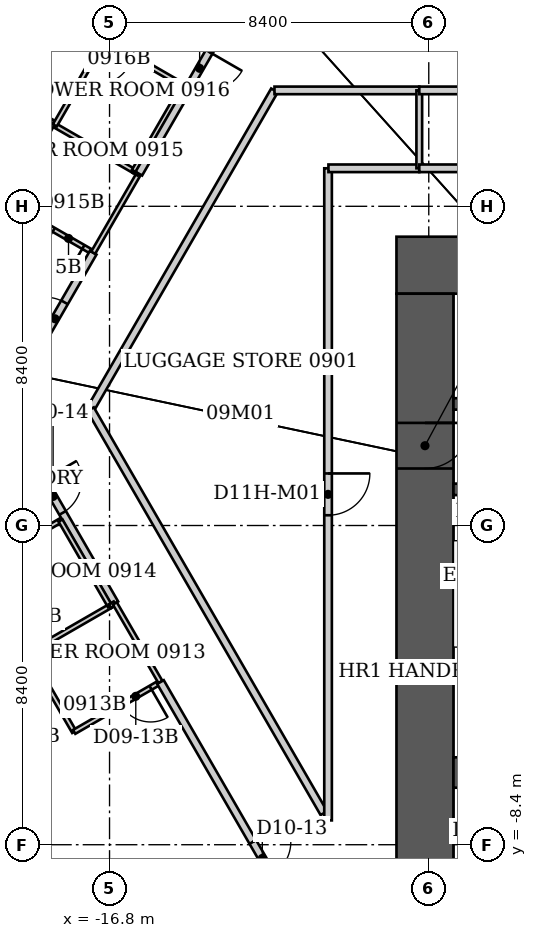
"""IFC4 building model, lengths in metres.
Left out: names, types, materials, properties, quantities, classifications, styles, units other than length and angle.
Written with IfcOpenShell. Run it as: python <this file> out.ifc"""

import sys

from ifc_helpers import new_model, si_unit, direction, frame, frame_2d, origin, place, context, subcontext, project, spatial, rectangle, extrude, element, fill, save


model = new_model("IFC4")
c1 = context("Model", 3, precision=1e-05, world=origin(), true_north=direction((0.0, 1.0)))
c2 = subcontext(c1, "Body", "Model", "MODEL_VIEW")
j1 = project(units=[si_unit("LENGTHUNIT", "METRE"), si_unit("PLANEANGLEUNIT", "RADIAN")], contexts=[c1])
p1 = place(None, origin())
s1 = spatial("IfcSite", under=j1, at=p1, CompositionType="ELEMENT")
p2 = place(p1, origin())
s2 = spatial("IfcBuilding", under=s1, at=p2, CompositionType="ELEMENT")
p3 = place(p2, frame((0.0, 0.0, 42.0)))
s3 = spatial("IfcBuildingStorey", under=s2, at=p3, CompositionType="ELEMENT", Elevation=42.0)
p4 = place(p3, frame((-9.25, 6.85, 0.0), z_axis=(0.0, 0.0, 1.0), x_axis=(1.0, 0.0, 0.0)))
e1 = element("IfcWall", 1, at=p4, inside=s3, PredefinedType="SHEAR", context=c2, shape_type="SweptSolid", body=[
    extrude(rectangle(XDim=18.5, YDim=1.5, at=frame_2d((9.25, 0.0))), origin(), (0.0, 0.0, 1.0), 3.8),
])
p5 = place(p3, frame((-8.5, -9.2, 0.0), z_axis=(0.0, 0.0, 1.0), x_axis=(0.0, 1.0, 0.0)))
e2 = element("IfcWall", 2, at=p5, inside=s3, PredefinedType="SHEAR", context=c2, shape_type="SweptSolid", body=[
    extrude(rectangle(XDim=15.3, YDim=1.5, at=frame_2d((7.65, 0.0))), origin(), (0.0, 0.0, 1.0), 3.8),
])
p6 = place(p5, frame((10.7, 0.0, 0.0)))
e3 = element("IfcOpeningElement", 3, at=p6, cuts=e2, PredefinedType="OPENING", context=c2, shape_type="SweptSolid", body=[
    extrude(rectangle(XDim=1.2, YDim=2.2, at=frame_2d((0.6, 1.1))), frame((0.0, 0.75, 0.0), z_axis=(0.0, -1.0, 0.0), x_axis=(1.0, 0.0, 0.0)), (0.0, 0.0, 1.0), 1.5),
])
p7 = place(p3, frame((-7.75, -6.5, 0.0), z_axis=(0.0, 0.0, 1.0), x_axis=(1.0, 0.0, 0.0)))
e4 = element("IfcWall", 4, at=p7, inside=s3, PredefinedType="SHEAR", context=c2, shape_type="SweptSolid", body=[
    extrude(rectangle(XDim=15.5, YDim=0.8, at=frame_2d((7.75, 0.0))), origin(), (0.0, 0.0, 1.0), 3.8),
])
p8 = place(p3, frame((-7.75, 0.95, 0.0), z_axis=(0.0, 0.0, 1.0), x_axis=(1.0, 0.0, 0.0)))
e5 = element("IfcWall", 5, at=p8, inside=s3, PredefinedType="SHEAR", context=c2, shape_type="SweptSolid", body=[
    extrude(rectangle(XDim=3.0, YDim=0.3, at=frame_2d((1.5, 0.0))), origin(), (0.0, 0.0, 1.0), 3.8),
])
p9 = place(p8, frame((0.85, 0.0, 0.0)))
e6 = element("IfcOpeningElement", 6, at=p9, cuts=e5, PredefinedType="OPENING", context=c2, shape_type="SweptSolid", body=[
    extrude(rectangle(XDim=1.0, YDim=2.2, at=frame_2d((0.5, 1.1))), frame((0.0, 0.15, 0.0), z_axis=(0.0, -1.0, 0.0), x_axis=(1.0, 0.0, 0.0)), (0.0, 0.0, 1.0), 0.3),
])
p10 = place(p3, frame((-7.75, 3.2, 0.0), z_axis=(0.0, 0.0, 1.0), x_axis=(1.0, 0.0, 0.0)))
e7 = element("IfcWall", 7, at=p10, inside=s3, PredefinedType="SHEAR", context=c2, shape_type="SweptSolid", body=[
    extrude(rectangle(XDim=15.5, YDim=0.3, at=frame_2d((7.75, 0.0))), origin(), (0.0, 0.0, 1.0), 3.8),
])
p11 = place(p10, frame((5.944, 0.0, 0.0)))
e8 = element("IfcOpeningElement", 8, at=p11, cuts=e7, PredefinedType="OPENING", context=c2, shape_type="SweptSolid", body=[
    extrude(rectangle(XDim=1.1, YDim=2.2, at=frame_2d((0.55, 1.1))), frame((0.0, 0.15, 0.0), z_axis=(0.0, -1.0, 0.0), x_axis=(1.0, 0.0, 0.0)), (0.0, 0.0, 1.0), 0.3),
])
p12 = place(p10, frame((11.144, 0.0, 0.0)))
e9 = element("IfcOpeningElement", 9, at=p12, cuts=e7, PredefinedType="OPENING", context=c2, shape_type="SweptSolid", body=[
    extrude(rectangle(XDim=1.1, YDim=2.2, at=frame_2d((0.55, 1.1))), frame((0.0, 0.15, 0.0), z_axis=(0.0, -1.0, 0.0), x_axis=(1.0, 0.0, 0.0)), (0.0, 0.0, 1.0), 0.3),
])
p13 = place(p3, frame((-25.886, 14.95, 0.0), z_axis=(0.0, 0.0, 1.0), x_axis=(0.866018495177, -0.500011965869, 0.0)))
e10 = element("IfcWall", 10, at=p13, inside=s3, PredefinedType="PARTITIONING", context=c2, shape_type="SweptSolid", body=[
    extrude(rectangle(XDim=8.76, YDim=0.2, at=frame_2d((4.38, 0.0))), origin(), (0.0, 0.0, 1.0), 2.86),
])
p14 = place(p3, frame((-19.61, 3.06, 0.0), z_axis=(0.0, 0.0, 1.0), x_axis=(0.499983910424, -0.866034692906, 0.0)))
e11 = element("IfcWall", 11, at=p14, inside=s3, PredefinedType="PARTITIONING", context=c2, shape_type="SweptSolid", body=[
    extrude(rectangle(XDim=5.901, YDim=0.2, at=frame_2d((2.95, 0.0))), origin(), (0.0, 0.0, 1.0), 3.64),
])
p15 = place(p14, frame((2.15, 0.0, 0.0)))
e12 = element("IfcOpeningElement", 12, at=p15, cuts=e11, PredefinedType="OPENING", context=c2, shape_type="SweptSolid", body=[
    extrude(rectangle(XDim=1.0, YDim=2.13, at=frame_2d((0.5, 1.065))), frame((0.0, 0.1, 0.0), z_axis=(0.0, -1.0, 0.0), x_axis=(1.0, 0.0, 0.0)), (0.0, 0.0, 1.0), 0.2),
])
p16 = place(p3, frame((-19.5, 8.49, 0.0), z_axis=(0.0, 0.0, 1.0), x_axis=(0.866114241029, -0.499846097802, 0.0)))
e13 = element("IfcWall", 13, at=p16, inside=s3, PredefinedType="PARTITIONING", context=c2, shape_type="SweptSolid", body=[
    extrude(rectangle(XDim=2.621, YDim=0.12, at=frame_2d((1.311, 0.0))), origin(), (0.0, 0.0, 1.0), 3.64),
])
p17 = place(p16, frame((1.421, 0.0, 0.0)))
e14 = element("IfcOpeningElement", 14, at=p17, cuts=e13, PredefinedType="OPENING", context=c2, shape_type="SweptSolid", body=[
    extrude(rectangle(XDim=0.9, YDim=2.03, at=frame_2d((0.45, 1.015))), frame((0.0, 0.06, 0.0), z_axis=(0.0, -1.0, 0.0), x_axis=(1.0, 0.0, 0.0)), (0.0, 0.0, 1.0), 0.12),
])
p18 = place(p3, frame((-19.24, 3.7, 0.0), z_axis=(0.0, 0.0, 1.0), x_axis=(0.500157149565, 0.865934654428, 0.0)))
e15 = element("IfcWall", 15, at=p18, inside=s3, PredefinedType="PARTITIONING", context=c2, shape_type="SweptSolid", body=[
    extrude(rectangle(XDim=4.019, YDim=0.2, at=frame_2d((2.009, 0.0))), origin(), (0.0, 0.0, 1.0), 3.64),
])
p19 = place(p18, frame((1.51, 0.0, 0.0)))
e16 = element("IfcOpeningElement", 16, at=p19, cuts=e15, PredefinedType="OPENING", context=c2, shape_type="SweptSolid", body=[
    extrude(rectangle(XDim=1.0, YDim=2.13, at=frame_2d((0.5, 1.065))), frame((0.0, 0.1, 0.0), z_axis=(0.0, -1.0, 0.0), x_axis=(1.0, 0.0, 0.0)), (0.0, 0.0, 1.0), 0.2),
])
p20 = place(p3, frame((-18.93, -3.36, 0.0), z_axis=(0.0, 0.0, 1.0), x_axis=(0.501547039172, -0.865130376012, 0.0)))
e17 = element("IfcWall", 17, at=p20, inside=s3, PredefinedType="PARTITIONING", context=c2, shape_type="SweptSolid", body=[
    extrude(rectangle(XDim=2.393, YDim=0.12, at=frame_2d((1.196, 0.0))), origin(), (0.0, 0.0, 1.0), 3.64),
])
for number, where, z_axis, x_axis in (
    (18, (-18.868, -3.324, 0.0), (0.0, 0.0, 1.0), (0.866, 0.5, 0.0)),
    (19, (-18.3, 10.57, 0.0), (0.0, 0.0, 1.0), (-0.5, -0.866, 0.0)),
):
    element("IfcWall", number, at=place(p3, frame(where, z_axis=z_axis, x_axis=x_axis)), inside=s3, PredefinedType="PARTITIONING", context=c2, shape_type="SweptSolid", body=[
        extrude(rectangle(XDim=2.401, YDim=0.12, at=frame_2d((1.201, 0.0))), origin(), (0.0, 0.0, 1.0), 3.64),
    ])
p21 = place(p3, frame((-18.24, 10.53, 0.0), z_axis=(0.0, 0.0, 1.0), x_axis=(0.866202511239, -0.499693115345, 0.0)))
e20 = element("IfcWall", 20, at=p21, inside=s3, PredefinedType="PARTITIONING", context=c2, shape_type="SweptSolid", body=[
    extrude(rectangle(XDim=2.401, YDim=0.12, at=frame_2d((1.201, 0.0))), origin(), (0.0, 0.0, 1.0), 2.86),
])
p22 = place(p3, frame((-18.09, 0.13, 0.0), z_axis=(0.0, 0.0, 1.0), x_axis=(-0.866177122335, -0.499737123639, 0.0)))
e21 = element("IfcWall", 21, at=p22, inside=s3, PredefinedType="PARTITIONING", context=c2, shape_type="SweptSolid", body=[
    extrude(rectangle(XDim=2.401, YDim=0.12, at=frame_2d((1.201, 0.0))), origin(), (0.0, 0.0, 1.0), 3.64),
])
p23 = place(p3, frame((-17.73, -5.43, 0.0), z_axis=(0.0, 0.0, 1.0), x_axis=(0.866114241029, 0.499846097802, 0.0)))
e22 = element("IfcWall", 22, at=p23, inside=s3, PredefinedType="PARTITIONING", context=c2, shape_type="SweptSolid", body=[
    extrude(rectangle(XDim=2.621, YDim=0.12, at=frame_2d((1.311, 0.0))), origin(), (0.0, 0.0, 1.0), 2.878),
])
p24 = place(p23, frame((1.421, 0.0, 0.0)))
e23 = element("IfcOpeningElement", 23, at=p24, cuts=e22, PredefinedType="OPENING", context=c2, shape_type="SweptSolid", body=[
    extrude(rectangle(XDim=0.9, YDim=2.03, at=frame_2d((0.45, 1.015))), frame((0.0, 0.06, 0.0), z_axis=(0.0, -1.0, 0.0), x_axis=(1.0, 0.0, 0.0)), (0.0, 0.0, 1.0), 0.12),
])
p25 = place(p3, frame((-17.3, 3.06, 0.0), z_axis=(0.0, 0.0, 1.0), x_axis=(0.499704269421, 0.866196076603, 0.0)))
e24 = element("IfcWall", 24, at=p25, inside=s3, PredefinedType="PARTITIONING", context=c2, shape_type="SweptSolid", body=[
    extrude(rectangle(XDim=9.686, YDim=0.2, at=frame_2d((4.843, 0.0))), origin(), (0.0, 0.0, 1.0), 3.64),
])
p26 = place(p3, frame((-17.23, 7.18, 0.0), z_axis=(0.0, 0.0, 1.0), x_axis=(0.500009943768, 0.866019662671, 0.0)))
e25 = element("IfcWall", 25, at=p26, inside=s3, PredefinedType="PARTITIONING", context=c2, shape_type="SweptSolid", body=[
    extrude(rectangle(XDim=2.401, YDim=0.12, at=frame_2d((1.201, 0.0))), origin(), (0.0, 0.0, 1.0), 3.64),
])
p27 = place(p3, frame((-16.94, 12.78, 0.0), z_axis=(0.0, 0.0, 1.0), x_axis=(-0.500291685314, -0.865856933682, 0.0)))
e26 = element("IfcWall", 26, at=p27, inside=s3, PredefinedType="PARTITIONING", context=c2, shape_type="SweptSolid", body=[
    extrude(rectangle(XDim=2.599, YDim=0.12, at=frame_2d((1.299, 0.0))), origin(), (0.0, 0.0, 1.0), 3.64),
])
p28 = place(p27, frame((0.3, 0.0, 0.0)))
e27 = element("IfcOpeningElement", 27, at=p28, cuts=e26, PredefinedType="OPENING", context=c2, shape_type="SweptSolid", body=[
    extrude(rectangle(XDim=0.9, YDim=2.03, at=frame_2d((0.45, 1.015))), frame((0.0, 0.06, 0.0), z_axis=(0.0, -1.0, 0.0), x_axis=(1.0, 0.0, 0.0)), (0.0, 0.0, 1.0), 0.12),
])
p29 = place(p3, frame((-16.79, -2.12, 0.0), z_axis=(0.0, 0.0, 1.0), x_axis=(-0.50025099007, 0.865880446098, 0.0)))
e28 = element("IfcWall", 28, at=p29, inside=s3, PredefinedType="PARTITIONING", context=c2, shape_type="SweptSolid", body=[
    extrude(rectangle(XDim=2.599, YDim=0.12, at=frame_2d((1.299, 0.0))), origin(), (0.0, 0.0, 1.0), 3.64),
])
p30 = place(p3, frame((-16.788, -2.124, 0.0), z_axis=(0.0, 0.0, 1.0), x_axis=(0.866405716731, 0.499340699338, 0.0)))
e29 = element("IfcWall", 29, at=p30, inside=s3, PredefinedType="PARTITIONING", context=c2, shape_type="SweptSolid", body=[
    extrude(rectangle(XDim=0.148, YDim=0.12, at=frame_2d((0.074, 0.0))), origin(), (0.0, 0.0, 1.0), 3.64),
])
p31 = place(p3, frame((-16.66, -2.05, 0.0), z_axis=(0.0, 0.0, 1.0), x_axis=(0.501502765098, -0.865156041763, 0.0)))
e30 = element("IfcWall", 30, at=p31, inside=s3, PredefinedType="PARTITIONING", context=c2, shape_type="SweptSolid", body=[
    extrude(rectangle(XDim=2.393, YDim=0.12, at=frame_2d((1.196, 0.0))), origin(), (0.0, 0.0, 1.0), 3.64),
])
p32 = place(p3, frame((-16.16, 9.33, 0.0), z_axis=(0.0, 0.0, 1.0), x_axis=(0.880098986228, -0.47479024257, 0.0)))
e31 = element("IfcWall", 31, at=p32, inside=s3, PredefinedType="PARTITIONING", context=c2, shape_type="SweptSolid", body=[
    extrude(rectangle(XDim=0.147, YDim=0.12, at=frame_2d((0.074, 0.0))), origin(), (0.0, 0.0, 1.0), 3.64),
])
p33 = place(p3, frame((-16.16, 9.33, 0.0), z_axis=(0.0, 0.0, 1.0), x_axis=(0.500291685314, 0.865856933682, 0.0)))
e32 = element("IfcWall", 32, at=p33, inside=s3, PredefinedType="PARTITIONING", context=c2, shape_type="SweptSolid", body=[
    extrude(rectangle(XDim=2.599, YDim=0.12, at=frame_2d((1.299, 0.0))), origin(), (0.0, 0.0, 1.0), 3.64),
])
p34 = place(p3, frame((-16.029, 9.26, 0.0), z_axis=(0.0, 0.0, 1.0), x_axis=(0.499975779801, 0.866039386871, 0.0)))
e33 = element("IfcWall", 33, at=p34, inside=s3, PredefinedType="PARTITIONING", context=c2, shape_type="SweptSolid", body=[
    extrude(rectangle(XDim=4.839, YDim=0.2, at=frame_2d((2.419, 0.0))), origin(), (0.0, 0.0, 1.0), 3.64),
])
p35 = place(p34, frame((2.7, 0.0, 0.0)))
e34 = element("IfcOpeningElement", 34, at=p35, cuts=e33, PredefinedType="OPENING", context=c2, shape_type="SweptSolid", body=[
    extrude(rectangle(XDim=1.0, YDim=2.13, at=frame_2d((0.5, 1.065))), frame((0.0, 0.1, 0.0), z_axis=(0.0, -1.0, 0.0), x_axis=(1.0, 0.0, 0.0)), (0.0, 0.0, 1.0), 0.2),
])
p36 = place(p3, frame((-15.46, -4.12, 0.0), z_axis=(0.0, 0.0, 1.0), x_axis=(0.500152338955, -0.865937432981, 0.0)))
e35 = element("IfcWall", 35, at=p36, inside=s3, PredefinedType="PARTITIONING", context=c2, shape_type="SweptSolid", body=[
    extrude(rectangle(XDim=10.717, YDim=0.2, at=frame_2d((5.358, 0.0))), origin(), (0.0, 0.0, 1.0), 3.64),
])
p37 = place(p36, frame((4.858, 0.0, 0.0)))
e36 = element("IfcOpeningElement", 36, at=p37, cuts=e35, PredefinedType="OPENING", context=c2, shape_type="SweptSolid", body=[
    extrude(rectangle(XDim=1.0, YDim=2.13, at=frame_2d((0.5, 1.065))), frame((0.0, 0.1, 0.0), z_axis=(0.0, -1.0, 0.0), x_axis=(1.0, 0.0, 0.0)), (0.0, 0.0, 1.0), 0.2),
])
p38 = place(p3, frame((-14.86, 11.58, 0.0), z_axis=(0.0, 0.0, 1.0), x_axis=(-0.866177122335, 0.499737123639, 0.0)))
e37 = element("IfcWall", 37, at=p38, inside=s3, PredefinedType="PARTITIONING", context=c2, shape_type="SweptSolid", body=[
    extrude(rectangle(XDim=2.401, YDim=0.12, at=frame_2d((1.201, 0.0))), origin(), (0.0, 0.0, 1.0), 3.64),
])
p39 = place(p3, frame((-12.46, 11.45, 0.0), z_axis=(0.0, 0.0, 1.0), x_axis=(1.0, 0.0, 0.0)))
e38 = element("IfcWall", 38, at=p39, inside=s3, PredefinedType="PARTITIONING", context=c2, shape_type="SweptSolid", body=[
    extrude(rectangle(XDim=3.81, YDim=0.2, at=frame_2d((1.905, 0.0))), origin(), (0.0, 0.0, 1.0), 3.64),
])
p40 = place(p3, frame((-11.16, -7.57, 0.0), z_axis=(0.0, 0.0, 1.0), x_axis=(-0.500175206663, 0.865924224537, 0.0)))
e39 = element("IfcWall", 39, at=p40, inside=s3, PredefinedType="PARTITIONING", context=c2, shape_type="SweptSolid", body=[
    extrude(rectangle(XDim=12.275, YDim=0.2, at=frame_2d((6.138, 0.0))), origin(), (0.0, 0.0, 1.0), 3.64),
])
p41 = place(p3, frame((-11.05, 9.4, 0.0), z_axis=(0.0, 0.0, 1.0), x_axis=(0.0, -1.0, 0.0)))
e40 = element("IfcWall", 40, at=p41, inside=s3, PredefinedType="PARTITIONING", context=c2, shape_type="SweptSolid", body=[
    extrude(rectangle(XDim=17.16, YDim=0.2, at=frame_2d((8.58, 0.0))), origin(), (0.0, 0.0, 1.0), 3.64),
])
p42 = place(p41, frame((8.03, 0.0, 0.0)))
e41 = element("IfcOpeningElement", 41, at=p42, cuts=e40, PredefinedType="OPENING", context=c2, shape_type="SweptSolid", body=[
    extrude(rectangle(XDim=1.1, YDim=2.2, at=frame_2d((0.55, 1.1))), frame((0.0, 0.1, 0.0), z_axis=(0.0, -1.0, 0.0), x_axis=(1.0, 0.0, 0.0)), (0.0, 0.0, 1.0), 0.2),
])
p43 = place(p3, frame((-8.65, 9.4, 0.0), z_axis=(0.0, 0.0, 1.0), x_axis=(-1.0, 0.0, 0.0)))
e42 = element("IfcWall", 42, at=p43, inside=s3, PredefinedType="PARTITIONING", context=c2, shape_type="SweptSolid", body=[
    extrude(rectangle(XDim=2.39, YDim=0.2, at=frame_2d((1.195, 0.0))), origin(), (0.0, 0.0, 1.0), 3.64),
])
p44 = place(p3, frame((-8.65, 11.45, 0.0), z_axis=(0.0, 0.0, 1.0), x_axis=(0.0, -1.0, 0.0)))
e43 = element("IfcWall", 43, at=p44, inside=s3, PredefinedType="PARTITIONING", context=c2, shape_type="SweptSolid", body=[
    extrude(rectangle(XDim=2.05, YDim=0.15, at=frame_2d((1.025, 0.0))), origin(), (0.0, 0.0, 1.0), 3.64),
])
p45 = place(p3, frame((-8.65, 11.45, 0.0), z_axis=(0.0, 0.0, 1.0), x_axis=(1.0, 0.0, 0.0)))
e44 = element("IfcWall", 44, at=p45, inside=s3, PredefinedType="PARTITIONING", context=c2, shape_type="SweptSolid", body=[
    extrude(rectangle(XDim=8.65, YDim=0.2, at=frame_2d((4.325, 0.0))), origin(), (0.0, 0.0, 1.0), 3.64),
])
p46 = place(p45, frame((3.775, 0.0, 0.0)))
e45 = element("IfcOpeningElement", 45, at=p46, cuts=e44, PredefinedType="OPENING", context=c2, shape_type="SweptSolid", body=[
    extrude(rectangle(XDim=1.1, YDim=2.2, at=frame_2d((0.55, 1.1))), frame((0.0, 0.1, 0.0), z_axis=(0.0, -1.0, 0.0), x_axis=(1.0, 0.0, 0.0)), (0.0, 0.0, 1.0), 0.2),
])
p47 = place(p3, frame((0.0, 9.4, 0.0), z_axis=(0.0, 0.0, 1.0), x_axis=(-1.0, 0.0, 0.0)))
e46 = element("IfcWall", 46, at=p47, inside=s3, PredefinedType="PARTITIONING", context=c2, shape_type="SweptSolid", body=[
    extrude(rectangle(XDim=8.65, YDim=0.2, at=frame_2d((4.325, 0.0))), origin(), (0.0, 0.0, 1.0), 3.64),
])
p48 = place(p37, origin())
e47 = element("IfcDoor", 47, at=p48, inside=s3, OperationType="SINGLE_SWING_LEFT", PredefinedType="DOOR", context=c2, shape_type="SweptSolid", body=[
    extrude(rectangle(XDim=1.0, YDim=2.13, at=frame_2d((0.5, 1.065))), frame((0.0, 0.025, 0.0), z_axis=(0.0, -1.0, 0.0), x_axis=(1.0, 0.0, 0.0)), (0.0, 0.0, 1.0), 0.05),
])
fill(e36, e47)
p49 = place(p24, origin())
e48 = element("IfcDoor", 48, at=p49, inside=s3, OperationType="SINGLE_SWING_RIGHT", PredefinedType="DOOR", context=c2, shape_type="SweptSolid", body=[
    extrude(rectangle(XDim=0.9, YDim=2.03, at=frame_2d((0.45, 1.015))), frame((0.0, 0.025, 0.0), z_axis=(0.0, -1.0, 0.0), x_axis=(1.0, 0.0, 0.0)), (0.0, 0.0, 1.0), 0.05),
])
fill(e23, e48)
p50 = place(p15, origin())
e49 = element("IfcDoor", 49, at=p50, inside=s3, OperationType="SINGLE_SWING_LEFT", PredefinedType="DOOR", context=c2, shape_type="SweptSolid", body=[
    extrude(rectangle(XDim=1.0, YDim=2.13, at=frame_2d((0.5, 1.065))), frame((0.0, 0.025, 0.0), z_axis=(0.0, -1.0, 0.0), x_axis=(1.0, 0.0, 0.0)), (0.0, 0.0, 1.0), 0.05),
])
fill(e12, e49)
p51 = place(p19, origin())
e50 = element("IfcDoor", 50, at=p51, inside=s3, OperationType="SINGLE_SWING_LEFT", PredefinedType="DOOR", context=c2, shape_type="SweptSolid", body=[
    extrude(rectangle(XDim=1.0, YDim=2.13, at=frame_2d((0.5, 1.065))), frame((0.0, 0.025, 0.0), z_axis=(0.0, -1.0, 0.0), x_axis=(1.0, 0.0, 0.0)), (0.0, 0.0, 1.0), 0.05),
])
fill(e16, e50)
p52 = place(p17, origin())
e51 = element("IfcDoor", 51, at=p52, inside=s3, OperationType="SINGLE_SWING_RIGHT", PredefinedType="DOOR", context=c2, shape_type="SweptSolid", body=[
    extrude(rectangle(XDim=0.9, YDim=2.03, at=frame_2d((0.45, 1.015))), frame((0.0, 0.025, 0.0), z_axis=(0.0, -1.0, 0.0), x_axis=(1.0, 0.0, 0.0)), (0.0, 0.0, 1.0), 0.05),
])
fill(e14, e51)
p53 = place(p35, origin())
e52 = element("IfcDoor", 52, at=p53, inside=s3, OperationType="SINGLE_SWING_RIGHT", PredefinedType="DOOR", context=c2, shape_type="SweptSolid", body=[
    extrude(rectangle(XDim=1.0, YDim=2.13, at=frame_2d((0.5, 1.065))), frame((0.0, 0.025, 0.0), z_axis=(0.0, -1.0, 0.0), x_axis=(1.0, 0.0, 0.0)), (0.0, 0.0, 1.0), 0.05),
])
fill(e34, e52)
p54 = place(p28, origin())
e53 = element("IfcDoor", 53, at=p54, inside=s3, OperationType="SINGLE_SWING_LEFT", PredefinedType="DOOR", context=c2, shape_type="SweptSolid", body=[
    extrude(rectangle(XDim=0.9, YDim=2.03, at=frame_2d((0.45, 1.015))), frame((0.0, 0.025, 0.0), z_axis=(0.0, -1.0, 0.0), x_axis=(1.0, 0.0, 0.0)), (0.0, 0.0, 1.0), 0.05),
])
fill(e27, e53)
p55 = place(p42, origin())
e54 = element("IfcDoor", 54, at=p55, inside=s3, OperationType="SINGLE_SWING_LEFT", PredefinedType="DOOR", context=c2, shape_type="SweptSolid", body=[
    extrude(rectangle(XDim=1.1, YDim=2.2, at=frame_2d((0.55, 1.1))), frame((0.0, 0.025, 0.0), z_axis=(0.0, -1.0, 0.0), x_axis=(1.0, 0.0, 0.0)), (0.0, 0.0, 1.0), 0.05),
])
fill(e41, e54)
p56 = place(p6, origin())
e55 = element("IfcDoor", 55, at=p56, inside=s3, OperationType="SINGLE_SWING_RIGHT", PredefinedType="DOOR", context=c2, shape_type="SweptSolid", body=[
    extrude(rectangle(XDim=1.2, YDim=2.2, at=frame_2d((0.6, 1.1))), frame((0.0, 0.025, 0.0), z_axis=(0.0, -1.0, 0.0), x_axis=(1.0, 0.0, 0.0)), (0.0, 0.0, 1.0), 0.05),
])
fill(e3, e55)
save(model, sys.argv[1])
